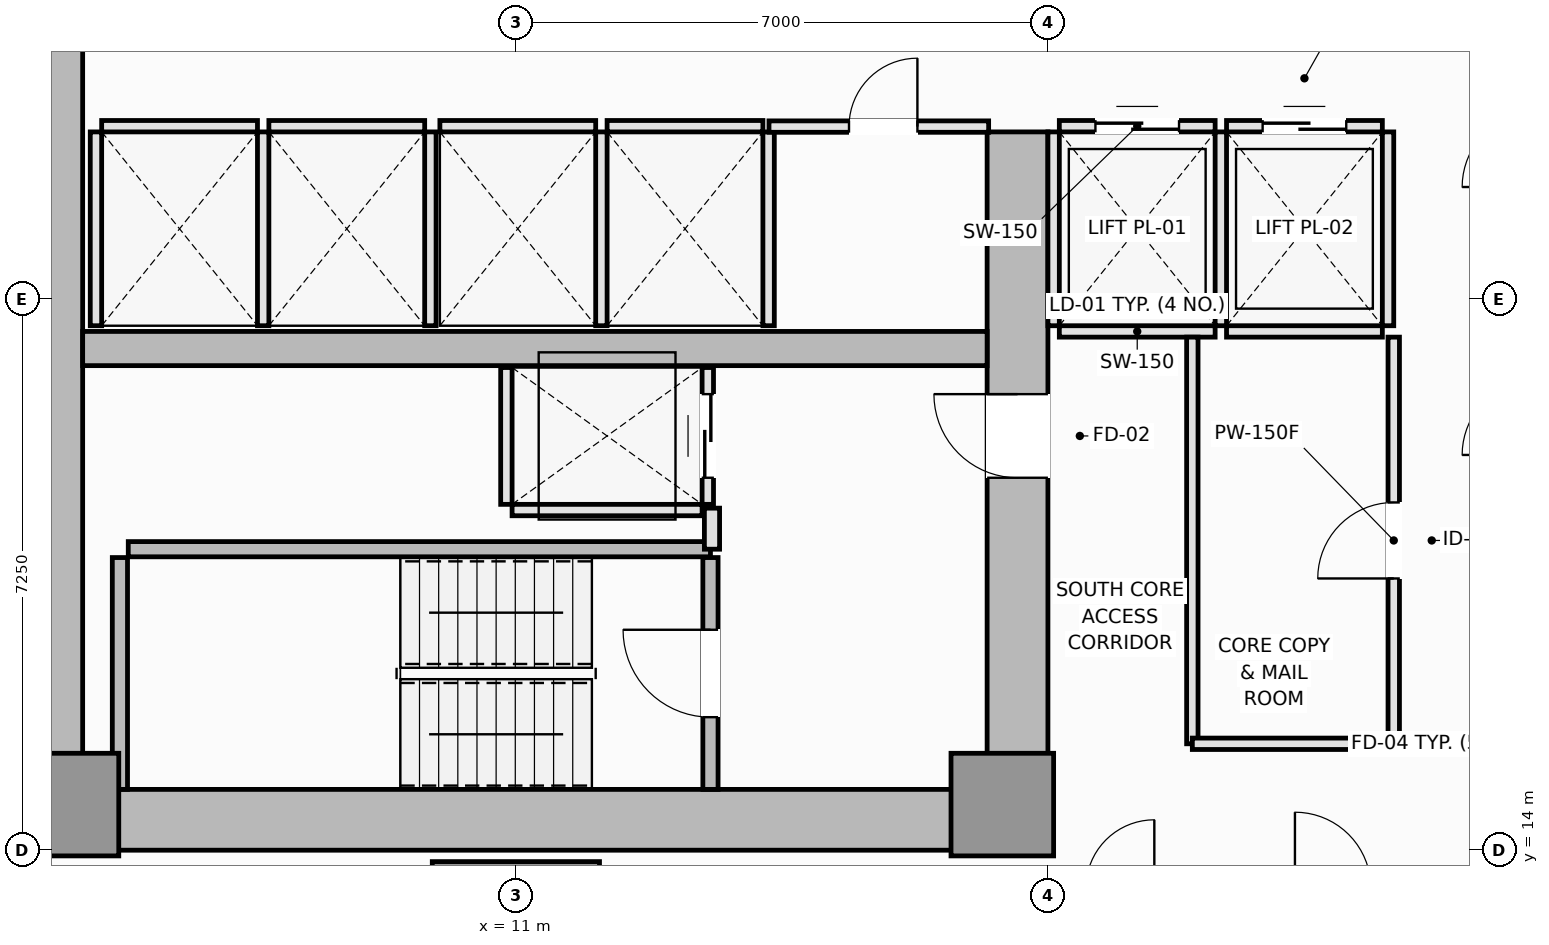
"""IFC4 building model, lengths in metres.
Left out: names, types, materials, properties, quantities, classifications, styles, units other than length and angle.
Written with IfcOpenShell. Run it as: python <this file> out.ifc"""

import sys

from ifc_helpers import new_model, si_unit, direction, frame, frame_2d, origin, origin_2d, place, context, subcontext, project, spatial, rectangle, extrude, element, fill, save


model = new_model("IFC4")
c1 = context("Model", 3, precision=1e-05, world=origin(), true_north=direction((0.0, 1.0)))
c2 = subcontext(c1, "Body", "Model", "MODEL_VIEW")
j1 = project(units=[si_unit("LENGTHUNIT", "METRE"), si_unit("PLANEANGLEUNIT", "RADIAN")], contexts=[c1])
p1 = place(None, origin())
s1 = spatial("IfcSite", under=j1, at=p1, CompositionType="ELEMENT")
p2 = place(p1, origin())
s2 = spatial("IfcBuilding", under=s1, at=p2, CompositionType="ELEMENT")
p3 = place(p2, frame((0.0, 0.0, 85.95)))
s3 = spatial("IfcBuildingStorey", under=s2, at=p3, CompositionType="ELEMENT", Elevation=85.95)
p4 = place(p3, frame((4.5, 14.4, 0.0), z_axis=(0.0, 0.0, 1.0), x_axis=(1.0, 0.0, 0.0)))
e1 = element("IfcWall", 1, at=p4, inside=s3, PredefinedType="SHEAR", context=c2, shape_type="SweptSolid", body=[
    extrude(rectangle(XDim=13.5, YDim=0.8, at=frame_2d((6.75, 0.0))), origin(), (0.0, 0.0, 1.0), 3.55),
])
p5 = place(p3, frame((4.9, 14.8, 0.0), z_axis=(0.0, 0.0, 1.0), x_axis=(0.0, 1.0, 0.0)))
e2 = element("IfcWall", 2, at=p5, inside=s3, PredefinedType="SHEAR", context=c2, shape_type="SweptSolid", body=[
    extrude(rectangle(XDim=20.9, YDim=0.8, at=frame_2d((10.45, 0.0))), origin(), (0.0, 0.0, 1.0), 3.55),
])
p6 = place(p3, frame((17.6, 14.8, 0.0), z_axis=(0.0, 0.0, 1.0), x_axis=(0.0, 1.0, 0.0)))
e3 = element("IfcWall", 3, at=p6, inside=s3, PredefinedType="SHEAR", context=c2, shape_type="SweptSolid", body=[
    extrude(rectangle(XDim=8.65, YDim=0.8, at=frame_2d((4.325, 0.0))), origin(), (0.0, 0.0, 1.0), 3.55),
])
p7 = place(p6, frame((4.1, 0.0, 0.0)))
e4 = element("IfcOpeningElement", 4, at=p7, cuts=e3, PredefinedType="OPENING", context=c2, shape_type="SweptSolid", body=[
    extrude(rectangle(XDim=1.1, YDim=2.15, at=frame_2d((0.55, 1.075))), frame((0.0, 0.41, 0.0), z_axis=(0.0, -1.0, 0.0), x_axis=(1.0, 0.0, 0.0)), (0.0, 0.0, 1.0), 0.82),
])
p8 = place(p3, frame((5.3, 20.6, 0.0), z_axis=(0.0, 0.0, 1.0), x_axis=(1.0, 0.0, 0.0)))
e5 = element("IfcWall", 5, at=p8, inside=s3, PredefinedType="SHEAR", context=c2, shape_type="SweptSolid", body=[
    extrude(rectangle(XDim=11.9, YDim=0.45, at=frame_2d((5.95, 0.0))), origin(), (0.0, 0.0, 1.0), 3.55),
])
for number, where, z_axis, x_axis in (
    (6, (5.1, 14.6, 0.0), (0.0, 0.0, 1.0), (1.0, 0.0, 0.0)),
    (7, (17.4, 14.6, 0.0), (0.0, 0.0, 1.0), (1.0, 0.0, 0.0)),
):
    element("IfcColumn", number, at=place(p3, frame(where, z_axis=z_axis, x_axis=x_axis)), inside=s3, PredefinedType="PILASTER", context=c2, shape_type="SweptSolid", body=[
        extrude(rectangle(XDim=1.35, YDim=1.35, at=origin_2d()), origin(), (0.0, 0.0, 1.0), 3.55),
    ])
p9 = place(p3, frame((11.0, 12.75, 0.0), z_axis=(0.0, 0.0, 1.0), x_axis=(1.0, 0.0, 0.0)))
e8 = element("IfcColumn", 8, at=p9, inside=s3, PredefinedType="COLUMN", context=c2, shape_type="SweptSolid", body=[
    extrude(rectangle(XDim=2.2, YDim=2.2, at=origin_2d()), origin(), (0.0, 0.0, 1.0), 3.55),
])
p10 = place(p3, frame((5.79, 14.8, 0.0), z_axis=(0.0, 0.0, 1.0), x_axis=(0.0, 1.0, 0.0)))
e9 = element("IfcWall", 9, at=p10, inside=s3, PredefinedType="SOLIDWALL", context=c2, shape_type="SweptSolid", body=[
    extrude(rectangle(XDim=3.05, YDim=0.2, at=frame_2d((1.525, 0.0))), origin(), (0.0, 0.0, 1.0), 3.55),
])
p11 = place(p3, frame((5.9, 17.96, 0.0), z_axis=(0.0, 0.0, 1.0), x_axis=(1.0, 0.0, 0.0)))
e10 = element("IfcWall", 10, at=p11, inside=s3, PredefinedType="SOLIDWALL", context=c2, shape_type="SweptSolid", body=[
    extrude(rectangle(XDim=7.66, YDim=0.2, at=frame_2d((3.83, 0.0))), origin(), (0.0, 0.0, 1.0), 3.55),
])
p12 = place(p3, frame((13.56, 14.8, 0.0), z_axis=(0.0, 0.0, 1.0), x_axis=(0.0, 1.0, 0.0)))
e11 = element("IfcWall", 11, at=p12, inside=s3, PredefinedType="SOLIDWALL", context=c2, shape_type="SweptSolid", body=[
    extrude(rectangle(XDim=3.05, YDim=0.2, at=frame_2d((1.525, 0.0))), origin(), (0.0, 0.0, 1.0), 3.55),
])
p13 = place(p12, frame((0.95, 0.0, 0.0)))
e12 = element("IfcOpeningElement", 12, at=p13, cuts=e11, PredefinedType="OPENING", context=c2, shape_type="SweptSolid", body=[
    extrude(rectangle(XDim=1.15, YDim=2.15, at=frame_2d((0.575, 1.075))), frame((0.0, 0.11, 0.0), z_axis=(0.0, -1.0, 0.0), x_axis=(1.0, 0.0, 0.0)), (0.0, 0.0, 1.0), 0.22),
])
p14 = place(p3, frame((18.15, 20.825, 0.0), z_axis=(0.0, 0.0, 1.0), x_axis=(1.0, 0.0, 0.0)))
e13 = element("IfcWall", 13, at=p14, inside=s3, PredefinedType="PARTITIONING", context=c2, shape_type="SweptSolid", body=[
    extrude(rectangle(XDim=2.05, YDim=0.15, at=frame_2d((1.025, 0.0))), origin(), (0.0, 0.0, 1.0), 3.37),
])
p15 = place(p3, frame((18.15, 23.525, 0.0), z_axis=(0.0, 0.0, 1.0), x_axis=(1.0, 0.0, 0.0)))
e14 = element("IfcWall", 14, at=p15, inside=s3, PredefinedType="PARTITIONING", context=c2, shape_type="SweptSolid", body=[
    extrude(rectangle(XDim=2.05, YDim=0.15, at=frame_2d((1.025, 0.0))), origin(), (0.0, 0.0, 1.0), 3.37),
])
p16 = place(p15, frame((0.475, 0.0, 0.0)))
e15 = element("IfcOpeningElement", 15, at=p16, cuts=e14, PredefinedType="OPENING", context=c2, shape_type="SweptSolid", body=[
    extrude(rectangle(XDim=1.1, YDim=2.2, at=frame_2d((0.55, 1.1))), frame((0.0, 0.085, 0.0), z_axis=(0.0, -1.0, 0.0), x_axis=(1.0, 0.0, 0.0)), (0.0, 0.0, 1.0), 0.17),
])
for number, where, z_axis, x_axis in (
    (16, (18.075, 20.9, 0.0), (0.0, 0.0, 1.0), (0.0, 1.0, 0.0)),
    (17, (20.275, 20.9, 0.0), (0.0, 0.0, 1.0), (0.0, 1.0, 0.0)),
):
    element("IfcWall", number, at=place(p3, frame(where, z_axis=z_axis, x_axis=x_axis)), inside=s3, PredefinedType="PARTITIONING", context=c2, shape_type="SweptSolid", body=[
        extrude(rectangle(XDim=2.55, YDim=0.15, at=frame_2d((1.275, 0.0))), origin(), (0.0, 0.0, 1.0), 3.37),
    ])
p17 = place(p3, frame((20.35, 20.825, 0.0), z_axis=(0.0, 0.0, 1.0), x_axis=(1.0, 0.0, 0.0)))
e18 = element("IfcWall", 18, at=p17, inside=s3, PredefinedType="PARTITIONING", context=c2, shape_type="SweptSolid", body=[
    extrude(rectangle(XDim=2.05, YDim=0.15, at=frame_2d((1.025, 0.0))), origin(), (0.0, 0.0, 1.0), 3.37),
])
p18 = place(p3, frame((20.35, 23.525, 0.0), z_axis=(0.0, 0.0, 1.0), x_axis=(1.0, 0.0, 0.0)))
e19 = element("IfcWall", 19, at=p18, inside=s3, PredefinedType="PARTITIONING", context=c2, shape_type="SweptSolid", body=[
    extrude(rectangle(XDim=2.05, YDim=0.15, at=frame_2d((1.025, 0.0))), origin(), (0.0, 0.0, 1.0), 3.37),
])
p19 = place(p18, frame((0.475, 0.0, 0.0)))
e20 = element("IfcOpeningElement", 20, at=p19, cuts=e19, PredefinedType="OPENING", context=c2, shape_type="SweptSolid", body=[
    extrude(rectangle(XDim=1.1, YDim=2.2, at=frame_2d((0.55, 1.1))), frame((0.0, 0.085, 0.0), z_axis=(0.0, -1.0, 0.0), x_axis=(1.0, 0.0, 0.0)), (0.0, 0.0, 1.0), 0.17),
])
p20 = place(p3, frame((22.475, 20.9, 0.0), z_axis=(0.0, 0.0, 1.0), x_axis=(0.0, 1.0, 0.0)))
e21 = element("IfcWall", 21, at=p20, inside=s3, PredefinedType="PARTITIONING", context=c2, shape_type="SweptSolid", body=[
    extrude(rectangle(XDim=2.55, YDim=0.15, at=frame_2d((1.275, 0.0))), origin(), (0.0, 0.0, 1.0), 3.37),
])
p21 = place(p3, frame((5.55, 23.525, 0.0), z_axis=(0.0, 0.0, 1.0), x_axis=(1.0, 0.0, 0.0)))
e22 = element("IfcWall", 22, at=p21, inside=s3, PredefinedType="PARTITIONING", context=c2, shape_type="SweptSolid", body=[
    extrude(rectangle(XDim=2.05, YDim=0.15, at=frame_2d((1.025, 0.0))), origin(), (0.0, 0.0, 1.0), 3.37),
])
for number, where, z_axis, x_axis in (
    (23, (5.475, 20.9, 0.0), (0.0, 0.0, 1.0), (0.0, 1.0, 0.0)),
    (24, (7.675, 20.9, 0.0), (0.0, 0.0, 1.0), (0.0, 1.0, 0.0)),
):
    element("IfcWall", number, at=place(p3, frame(where, z_axis=z_axis, x_axis=x_axis)), inside=s3, PredefinedType="PARTITIONING", context=c2, shape_type="SweptSolid", body=[
        extrude(rectangle(XDim=2.55, YDim=0.15, at=frame_2d((1.275, 0.0))), origin(), (0.0, 0.0, 1.0), 3.37),
    ])
p22 = place(p3, frame((7.75, 23.525, 0.0), z_axis=(0.0, 0.0, 1.0), x_axis=(1.0, 0.0, 0.0)))
e25 = element("IfcWall", 25, at=p22, inside=s3, PredefinedType="PARTITIONING", context=c2, shape_type="SweptSolid", body=[
    extrude(rectangle(XDim=2.05, YDim=0.15, at=frame_2d((1.025, 0.0))), origin(), (0.0, 0.0, 1.0), 3.37),
])
p23 = place(p3, frame((9.875, 20.9, 0.0), z_axis=(0.0, 0.0, 1.0), x_axis=(0.0, 1.0, 0.0)))
e26 = element("IfcWall", 26, at=p23, inside=s3, PredefinedType="PARTITIONING", context=c2, shape_type="SweptSolid", body=[
    extrude(rectangle(XDim=2.55, YDim=0.15, at=frame_2d((1.275, 0.0))), origin(), (0.0, 0.0, 1.0), 3.37),
])
p24 = place(p3, frame((10.0, 23.525, 0.0), z_axis=(0.0, 0.0, 1.0), x_axis=(1.0, 0.0, 0.0)))
e27 = element("IfcWall", 27, at=p24, inside=s3, PredefinedType="PARTITIONING", context=c2, shape_type="SweptSolid", body=[
    extrude(rectangle(XDim=2.05, YDim=0.15, at=frame_2d((1.025, 0.0))), origin(), (0.0, 0.0, 1.0), 3.37),
])
p25 = place(p3, frame((12.125, 20.9, 0.0), z_axis=(0.0, 0.0, 1.0), x_axis=(0.0, 1.0, 0.0)))
e28 = element("IfcWall", 28, at=p25, inside=s3, PredefinedType="PARTITIONING", context=c2, shape_type="SweptSolid", body=[
    extrude(rectangle(XDim=2.55, YDim=0.15, at=frame_2d((1.275, 0.0))), origin(), (0.0, 0.0, 1.0), 3.37),
])
p26 = place(p3, frame((12.2, 23.525, 0.0), z_axis=(0.0, 0.0, 1.0), x_axis=(1.0, 0.0, 0.0)))
e29 = element("IfcWall", 29, at=p26, inside=s3, PredefinedType="PARTITIONING", context=c2, shape_type="SweptSolid", body=[
    extrude(rectangle(XDim=2.05, YDim=0.15, at=frame_2d((1.025, 0.0))), origin(), (0.0, 0.0, 1.0), 3.37),
])
p27 = place(p3, frame((14.325, 20.9, 0.0), z_axis=(0.0, 0.0, 1.0), x_axis=(0.0, 1.0, 0.0)))
e30 = element("IfcWall", 30, at=p27, inside=s3, PredefinedType="PARTITIONING", context=c2, shape_type="SweptSolid", body=[
    extrude(rectangle(XDim=2.55, YDim=0.15, at=frame_2d((1.275, 0.0))), origin(), (0.0, 0.0, 1.0), 3.37),
])
p28 = place(p3, frame((10.95, 18.475, 0.0), z_axis=(0.0, 0.0, 1.0), x_axis=(1.0, 0.0, 0.0)))
e31 = element("IfcWall", 31, at=p28, inside=s3, PredefinedType="PARTITIONING", context=c2, shape_type="SweptSolid", body=[
    extrude(rectangle(XDim=2.5, YDim=0.15, at=frame_2d((1.25, 0.0))), origin(), (0.0, 0.0, 1.0), 3.37),
])
p29 = place(p3, frame((10.875, 18.55, 0.0), z_axis=(0.0, 0.0, 1.0), x_axis=(0.0, 1.0, 0.0)))
e32 = element("IfcWall", 32, at=p29, inside=s3, PredefinedType="PARTITIONING", context=c2, shape_type="SweptSolid", body=[
    extrude(rectangle(XDim=1.8, YDim=0.15, at=frame_2d((0.9, 0.0))), origin(), (0.0, 0.0, 1.0), 3.37),
])
p30 = place(p3, frame((13.525, 18.55, 0.0), z_axis=(0.0, 0.0, 1.0), x_axis=(0.0, 1.0, 0.0)))
e33 = element("IfcWall", 33, at=p30, inside=s3, PredefinedType="PARTITIONING", context=c2, shape_type="SweptSolid", body=[
    extrude(rectangle(XDim=1.8, YDim=0.15, at=frame_2d((0.9, 0.0))), origin(), (0.0, 0.0, 1.0), 3.37),
])
p31 = place(p30, frame((0.35, 0.0, 0.0)))
e34 = element("IfcOpeningElement", 34, at=p31, cuts=e33, PredefinedType="OPENING", context=c2, shape_type="SweptSolid", body=[
    extrude(rectangle(XDim=1.1, YDim=2.2, at=frame_2d((0.55, 1.1))), frame((0.0, 0.085, 0.0), z_axis=(0.0, -1.0, 0.0), x_axis=(1.0, 0.0, 0.0)), (0.0, 0.0, 1.0), 0.17),
])
p32 = place(p3, frame((13.58, 17.96, 0.0), z_axis=(0.0, 0.0, 1.0), x_axis=(0.0, 1.0, 0.0)))
e35 = element("IfcWall", 35, at=p32, inside=s3, PredefinedType="PARTITIONING", context=c2, shape_type="SweptSolid", body=[
    extrude(rectangle(XDim=0.54, YDim=0.2, at=frame_2d((0.27, 0.0))), origin(), (0.0, 0.0, 1.0), 3.37),
])
p33 = place(p3, frame((14.33, 23.52, 0.0), z_axis=(0.0, 0.0, 1.0), x_axis=(1.0, 0.0, 0.0)))
e36 = element("IfcWall", 36, at=p33, inside=s3, PredefinedType="PARTITIONING", context=c2, shape_type="SweptSolid", body=[
    extrude(rectangle(XDim=2.89, YDim=0.15, at=frame_2d((1.445, 0.0))), origin(), (0.0, 0.0, 1.0), 3.37),
])
p34 = place(p33, frame((1.053, 0.0, 0.0)))
e37 = element("IfcOpeningElement", 37, at=p34, cuts=e36, PredefinedType="OPENING", context=c2, shape_type="SweptSolid", body=[
    extrude(rectangle(XDim=0.9, YDim=2.1, at=frame_2d((0.45, 1.05))), frame((0.0, 0.085, 0.0), z_axis=(0.0, -1.0, 0.0), x_axis=(1.0, 0.0, 0.0)), (0.0, 0.0, 1.0), 0.17),
])
p35 = place(p3, frame((22.55, 15.4, 0.0), z_axis=(0.0, 0.0, 1.0), x_axis=(0.0, 1.0, 0.0)))
e38 = element("IfcWall", 38, at=p35, inside=s3, PredefinedType="PARTITIONING", context=c2, shape_type="SweptSolid", body=[
    extrude(rectangle(XDim=5.35, YDim=0.15, at=frame_2d((2.675, 0.0))), origin(), (0.0, 0.0, 1.0), 3.01),
])
p36 = place(p35, frame((2.175, 0.0, 0.0)))
e39 = element("IfcOpeningElement", 39, at=p36, cuts=e38, PredefinedType="OPENING", context=c2, shape_type="SweptSolid", body=[
    extrude(rectangle(XDim=1.0, YDim=2.15, at=frame_2d((0.5, 1.075))), frame((0.0, 0.085, 0.0), z_axis=(0.0, -1.0, 0.0), x_axis=(1.0, 0.0, 0.0)), (0.0, 0.0, 1.0), 0.17),
])
p37 = place(p3, frame((19.9, 15.4, 0.0), z_axis=(0.0, 0.0, 1.0), x_axis=(0.0, 1.0, 0.0)))
e40 = element("IfcWall", 40, at=p37, inside=s3, PredefinedType="PARTITIONING", context=c2, shape_type="SweptSolid", body=[
    extrude(rectangle(XDim=5.35, YDim=0.15, at=frame_2d((2.675, 0.0))), origin(), (0.0, 0.0, 1.0), 3.37),
])
p38 = place(p3, frame((19.9, 15.4, 0.0), z_axis=(0.0, 0.0, 1.0), x_axis=(1.0, 0.0, 0.0)))
e41 = element("IfcWall", 41, at=p38, inside=s3, PredefinedType="PARTITIONING", context=c2, shape_type="SweptSolid", body=[
    extrude(rectangle(XDim=2.65, YDim=0.15, at=frame_2d((1.325, 0.0))), origin(), (0.0, 0.0, 1.0), 3.37),
])
p39 = place(p13, origin())
e42 = element("IfcDoor", 42, at=p39, inside=s3, OperationType="SINGLE_SWING_RIGHT", PredefinedType="DOOR", context=c2, shape_type="SweptSolid", body=[
    extrude(rectangle(XDim=1.15, YDim=2.15, at=frame_2d((0.575, 1.075))), frame((0.0, 0.025, 0.0), z_axis=(0.0, -1.0, 0.0), x_axis=(1.0, 0.0, 0.0)), (0.0, 0.0, 1.0), 0.05),
])
fill(e12, e42)
p40 = place(p16, origin())
e43 = element("IfcDoor", 43, at=p40, inside=s3, OperationType="DOUBLE_DOOR_SLIDING", PredefinedType="DOOR", context=c2, shape_type="SweptSolid", body=[
    extrude(rectangle(XDim=1.1, YDim=2.2, at=frame_2d((0.55, 1.1))), frame((0.0, 0.025, 0.0), z_axis=(0.0, -1.0, 0.0), x_axis=(1.0, 0.0, 0.0)), (0.0, 0.0, 1.0), 0.05),
])
fill(e15, e43)
p41 = place(p19, origin())
e44 = element("IfcDoor", 44, at=p41, inside=s3, OperationType="DOUBLE_DOOR_SLIDING", PredefinedType="DOOR", context=c2, shape_type="SweptSolid", body=[
    extrude(rectangle(XDim=1.1, YDim=2.2, at=frame_2d((0.55, 1.1))), frame((0.0, 0.025, 0.0), z_axis=(0.0, -1.0, 0.0), x_axis=(1.0, 0.0, 0.0)), (0.0, 0.0, 1.0), 0.05),
])
fill(e20, e44)
p42 = place(p31, origin())
e45 = element("IfcDoor", 45, at=p42, inside=s3, OperationType="DOUBLE_DOOR_SLIDING", PredefinedType="DOOR", context=c2, shape_type="SweptSolid", body=[
    extrude(rectangle(XDim=1.1, YDim=2.2, at=frame_2d((0.55, 1.1))), frame((0.0, 0.025, 0.0), z_axis=(0.0, -1.0, 0.0), x_axis=(1.0, 0.0, 0.0)), (0.0, 0.0, 1.0), 0.05),
])
fill(e34, e45)
p43 = place(p7, origin())
e46 = element("IfcDoor", 46, at=p43, inside=s3, OperationType="SINGLE_SWING_RIGHT", PredefinedType="DOOR", context=c2, shape_type="SweptSolid", body=[
    extrude(rectangle(XDim=1.1, YDim=2.15, at=frame_2d((0.55, 1.075))), frame((0.0, 0.025, 0.0), z_axis=(0.0, -1.0, 0.0), x_axis=(1.0, 0.0, 0.0)), (0.0, 0.0, 1.0), 0.05),
])
fill(e4, e46)
p44 = place(p34, origin())
e47 = element("IfcDoor", 47, at=p44, inside=s3, OperationType="SINGLE_SWING_RIGHT", PredefinedType="DOOR", context=c2, shape_type="SweptSolid", body=[
    extrude(rectangle(XDim=0.9, YDim=2.1, at=frame_2d((0.45, 1.05))), frame((0.0, 0.025, 0.0), z_axis=(0.0, -1.0, 0.0), x_axis=(1.0, 0.0, 0.0)), (0.0, 0.0, 1.0), 0.05),
])
fill(e37, e47)
p45 = place(p36, origin())
e48 = element("IfcDoor", 48, at=p45, inside=s3, OperationType="SINGLE_SWING_LEFT", PredefinedType="DOOR", context=c2, shape_type="SweptSolid", body=[
    extrude(rectangle(XDim=1.0, YDim=2.15, at=frame_2d((0.5, 1.075))), frame((0.0, 0.025, 0.0), z_axis=(0.0, -1.0, 0.0), x_axis=(1.0, 0.0, 0.0)), (0.0, 0.0, 1.0), 0.05),
])
fill(e39, e48)
save(model, sys.argv[1])
